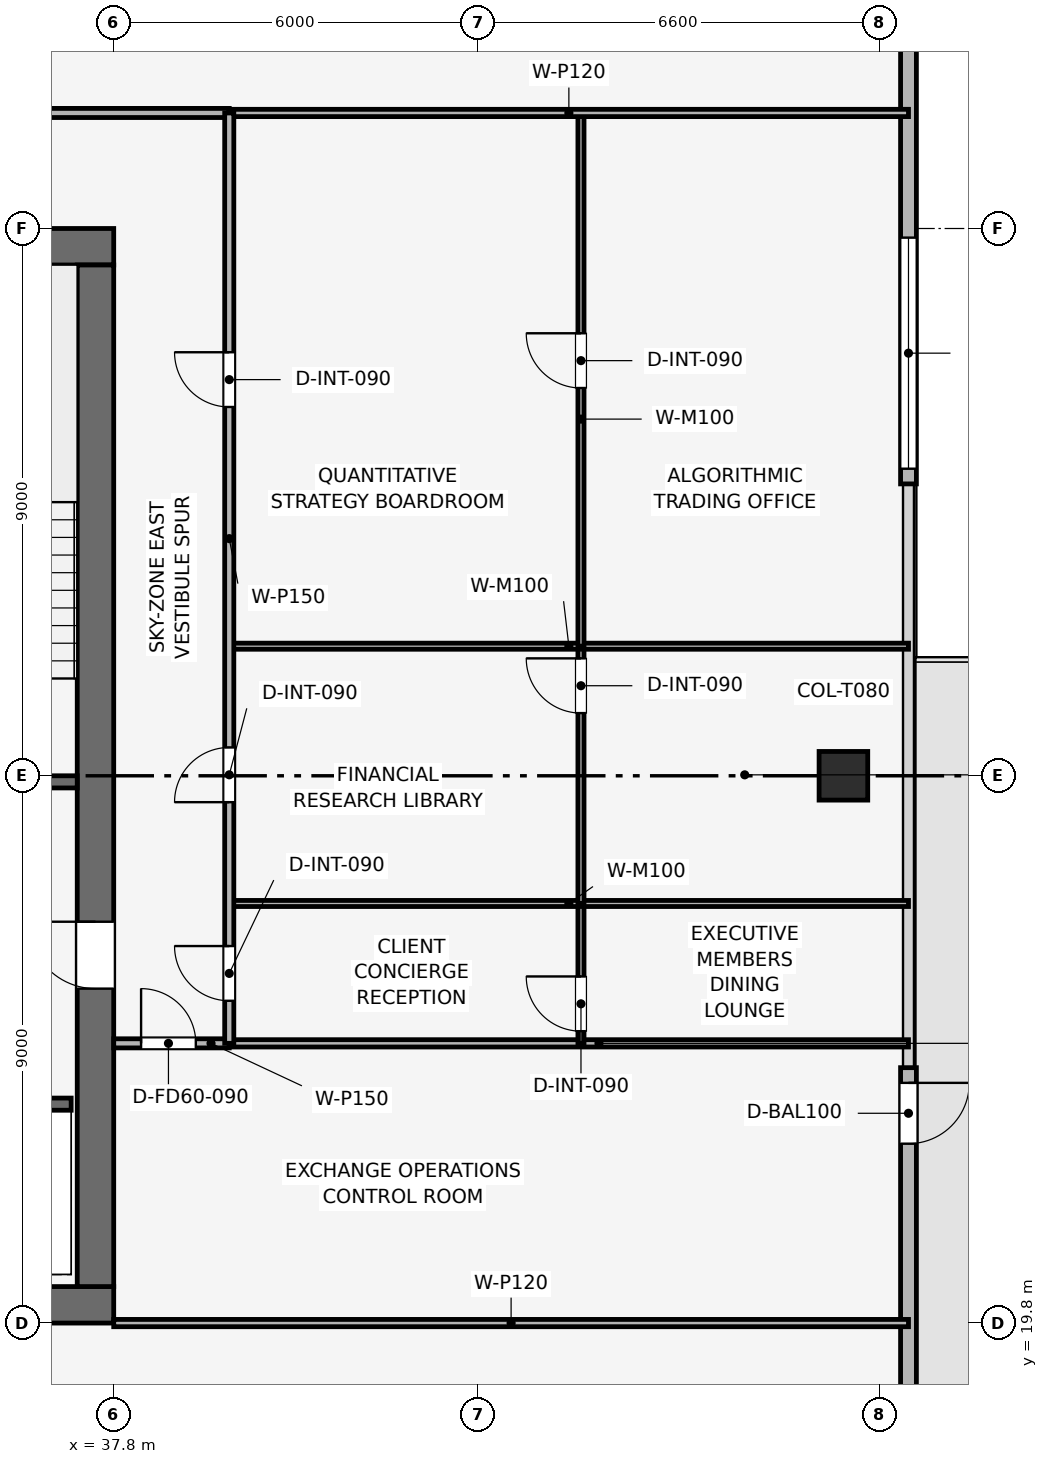
"""IFC4 building model, lengths in metres.
Left out: names, types, materials, properties, quantities, classifications, styles, units other than length and angle.
Written with IfcOpenShell. Run it as: python <this file> out.ifc"""

import sys

from ifc_helpers import new_model, si_unit, direction, frame, frame_2d, origin, origin_2d, place, context, subcontext, project, spatial, rectangle, extrude, element, fill, save


model = new_model("IFC4")
c1 = context("Model", 3, precision=1e-05, world=origin(), true_north=direction((0.0, 1.0)))
c2 = subcontext(c1, "Body", "Model", "MODEL_VIEW")
j1 = project(units=[si_unit("LENGTHUNIT", "METRE"), si_unit("PLANEANGLEUNIT", "RADIAN")], contexts=[c1])
p1 = place(None, origin())
s1 = spatial("IfcSite", under=j1, at=p1, CompositionType="ELEMENT")
p2 = place(p1, origin())
s2 = spatial("IfcBuilding", under=s1, at=p2, CompositionType="ELEMENT")
p3 = place(p2, frame((0.0, 0.0, 336.75)))
s3 = spatial("IfcBuildingStorey", under=s2, at=p3, CompositionType="ELEMENT", Elevation=336.75)
p4 = place(p3, frame((19.8, 20.1, 0.0), z_axis=(0.0, 0.0, 1.0), x_axis=(1.0, 0.0, 0.0)))
e1 = element("IfcWall", 1, at=p4, inside=s3, PredefinedType="SHEAR", context=c2, shape_type="SweptSolid", body=[
    extrude(rectangle(XDim=18.0, YDim=0.6, at=frame_2d((9.0, 0.0))), origin(), (0.0, 0.0, 1.0), 3.75),
])
p5 = place(p3, frame((19.8, 37.5, 0.0), z_axis=(0.0, 0.0, 1.0), x_axis=(1.0, 0.0, 0.0)))
e2 = element("IfcWall", 2, at=p5, inside=s3, PredefinedType="SHEAR", context=c2, shape_type="SweptSolid", body=[
    extrude(rectangle(XDim=18.0, YDim=0.6, at=frame_2d((9.0, 0.0))), origin(), (0.0, 0.0, 1.0), 3.75),
])
p6 = place(p5, frame((7.05, 0.0, 0.0)))
e3 = element("IfcOpeningElement", 3, at=p6, cuts=e2, PredefinedType="OPENING", context=c2, shape_type="SweptSolid", body=[
    extrude(rectangle(XDim=1.1, YDim=2.15, at=frame_2d((0.55, 1.075))), frame((0.0, 0.31, 0.0), z_axis=(0.0, -1.0, 0.0), x_axis=(1.0, 0.0, 0.0)), (0.0, 0.0, 1.0), 0.62),
])
p7 = place(p3, frame((37.5, 20.4, 0.0), z_axis=(0.0, 0.0, 1.0), x_axis=(0.0, 1.0, 0.0)))
e4 = element("IfcWall", 4, at=p7, inside=s3, PredefinedType="SHEAR", context=c2, shape_type="SweptSolid", body=[
    extrude(rectangle(XDim=16.8, YDim=0.6, at=frame_2d((8.4, 0.0))), origin(), (0.0, 0.0, 1.0), 3.75),
])
p8 = place(p7, frame((4.9, 0.0, 0.0)))
e5 = element("IfcOpeningElement", 5, at=p8, cuts=e4, PredefinedType="OPENING", context=c2, shape_type="SweptSolid", body=[
    extrude(rectangle(XDim=1.1, YDim=2.15, at=frame_2d((0.55, 1.075))), frame((0.0, 0.31, 0.0), z_axis=(0.0, -1.0, 0.0), x_axis=(1.0, 0.0, 0.0)), (0.0, 0.0, 1.0), 0.62),
])
p9 = place(p3, frame((49.8, 28.8, 0.003), z_axis=(0.0, 0.0, 1.0), x_axis=(1.0, 0.0, 0.0)))
e6 = element("IfcColumn", 6, at=p9, inside=s3, PredefinedType="COLUMN", context=c2, shape_type="SweptSolid", body=[
    extrude(rectangle(XDim=0.8, YDim=0.8, at=origin_2d()), origin(), (0.0, 0.0, 1.0), 3.504),
])
p10 = place(p3, frame((50.87, 45.0, 0.0), z_axis=(0.0, 0.0, 1.0), x_axis=(0.0, -1.0, 0.0)))
e7 = element("IfcWall", 7, at=p10, inside=s3, PredefinedType="SOLIDWALL", context=c2, shape_type="SweptSolid", body=[
    extrude(rectangle(XDim=11.4, YDim=0.26, at=frame_2d((5.7, 0.0))), origin(), (0.0, 0.0, 1.0), 3.51),
])
p11 = place(p10, frame((7.35, 0.0, 0.9)))
e8 = element("IfcOpeningElement", 8, at=p11, cuts=e7, PredefinedType="OPENING", context=c2, shape_type="SweptSolid", body=[
    extrude(rectangle(XDim=3.8, YDim=1.9, at=frame_2d((1.9, 0.95))), frame((0.0, 0.14, 0.0), z_axis=(0.0, -1.0, 0.0), x_axis=(1.0, 0.0, 0.0)), (0.0, 0.0, 1.0), 0.28),
])
p12 = place(p3, frame((50.87, 24.0, 0.0), z_axis=(0.0, 0.0, 1.0), x_axis=(0.0, -1.0, 0.0)))
e9 = element("IfcWall", 9, at=p12, inside=s3, PredefinedType="SOLIDWALL", context=c2, shape_type="SweptSolid", body=[
    extrude(rectangle(XDim=11.4, YDim=0.26, at=frame_2d((5.7, 0.0))), origin(), (0.0, 0.0, 1.0), 3.51),
])
p13 = place(p12, frame((0.25, 0.0, 0.0)))
e10 = element("IfcOpeningElement", 10, at=p13, cuts=e9, PredefinedType="OPENING", context=c2, shape_type="SweptSolid", body=[
    extrude(rectangle(XDim=1.0, YDim=2.2, at=frame_2d((0.5, 1.1))), frame((0.0, 0.14, 0.0), z_axis=(0.0, -1.0, 0.0), x_axis=(1.0, 0.0, 0.0)), (0.0, 0.0, 1.0), 0.28),
])
p14 = place(p3, frame((34.05, 28.7, 0.0), z_axis=(0.0, 0.0, 1.0), x_axis=(1.0, 0.0, 0.0)))
e11 = element("IfcWall", 11, at=p14, inside=s3, PredefinedType="SHEAR", context=c2, shape_type="SweptSolid", body=[
    extrude(rectangle(XDim=3.15, YDim=0.2, at=frame_2d((1.575, 0.0))), origin(), (0.0, 0.0, 1.0), 3.51),
])
p15 = place(p14, frame((0.8, 0.0, 0.0)))
e12 = element("IfcOpeningElement", 12, at=p15, cuts=e11, PredefinedType="OPENING", context=c2, shape_type="SweptSolid", body=[
    extrude(rectangle(XDim=1.0, YDim=2.1, at=frame_2d((0.5, 1.05))), frame((0.0, 0.11, 0.0), z_axis=(0.0, -1.0, 0.0), x_axis=(1.0, 0.0, 0.0)), (0.0, 0.0, 1.0), 0.22),
])
p16 = place(p3, frame((34.05, 23.4, 0.0), z_axis=(0.0, 0.0, 1.0), x_axis=(1.0, 0.0, 0.0)))
e13 = element("IfcWall", 13, at=p16, inside=s3, PredefinedType="SHEAR", context=c2, shape_type="SweptSolid", body=[
    extrude(rectangle(XDim=3.05, YDim=0.2, at=frame_2d((1.525, 0.0))), origin(), (0.0, 0.0, 1.0), 3.51),
])
p17 = place(p16, frame((1.2, 0.0, 0.0)))
e14 = element("IfcOpeningElement", 14, at=p17, cuts=e13, PredefinedType="OPENING", context=c2, shape_type="SweptSolid", body=[
    extrude(rectangle(XDim=1.1, YDim=2.15, at=frame_2d((0.55, 1.075))), frame((0.0, 0.11, 0.0), z_axis=(0.0, -1.0, 0.0), x_axis=(1.0, 0.0, 0.0)), (0.0, 0.0, 1.0), 0.22),
])
p18 = place(p3, frame((37.8, 19.8, 0.0), z_axis=(0.0, 0.0, 1.0), x_axis=(1.0, 0.0, 0.0)))
e15 = element("IfcWall", 15, at=p18, inside=s3, PredefinedType="PARTITIONING", context=c2, shape_type="SweptSolid", body=[
    extrude(rectangle(XDim=13.07, YDim=0.12, at=frame_2d((6.535, 0.0))), origin(), (0.0, 0.0, 1.0), 3.095),
])
p19 = place(p3, frame((37.8, 24.4, 0.0), z_axis=(0.0, 0.0, 1.0), x_axis=(1.0, 0.0, 0.0)))
e16 = element("IfcWall", 16, at=p19, inside=s3, PredefinedType="PARTITIONING", context=c2, shape_type="SweptSolid", body=[
    extrude(rectangle(XDim=1.9, YDim=0.15, at=frame_2d((0.95, 0.0))), origin(), (0.0, 0.0, 1.0), 3.51),
])
p20 = place(p19, frame((0.45, 0.0, 0.0)))
e17 = element("IfcOpeningElement", 17, at=p20, cuts=e16, PredefinedType="OPENING", context=c2, shape_type="SweptSolid", body=[
    extrude(rectangle(XDim=0.9, YDim=2.1, at=frame_2d((0.45, 1.05))), frame((0.0, 0.085, 0.0), z_axis=(0.0, -1.0, 0.0), x_axis=(1.0, 0.0, 0.0)), (0.0, 0.0, 1.0), 0.17),
])
p21 = place(p3, frame((39.7, 24.4, 0.0), z_axis=(0.0, 0.0, 1.0), x_axis=(1.0, 0.0, 0.0)))
e18 = element("IfcWall", 18, at=p21, inside=s3, PredefinedType="PARTITIONING", context=c2, shape_type="SweptSolid", body=[
    extrude(rectangle(XDim=11.17, YDim=0.12, at=frame_2d((5.585, 0.0))), origin(), (0.0, 0.0, 1.0), 3.135),
])
p22 = place(p3, frame((45.484, 24.4, 0.0), z_axis=(0.0, 0.0, 1.0), x_axis=(0.0, 1.0, 0.0)))
e19 = element("IfcWall", 19, at=p22, inside=s3, PredefinedType="MOVABLE", context=c2, shape_type="SweptSolid", body=[
    extrude(rectangle(XDim=2.3, YDim=0.1, at=frame_2d((1.15, 0.0))), origin(), (0.0, 0.0, 1.0), 3.51),
])
p23 = place(p22, frame((0.2, 0.0, 0.0)))
e20 = element("IfcOpeningElement", 20, at=p23, cuts=e19, PredefinedType="OPENING", context=c2, shape_type="SweptSolid", body=[
    extrude(rectangle(XDim=0.9, YDim=2.1, at=frame_2d((0.45, 1.05))), frame((0.0, 0.06, 0.0), z_axis=(0.0, -1.0, 0.0), x_axis=(1.0, 0.0, 0.0)), (0.0, 0.0, 1.0), 0.12),
])
p24 = place(p3, frame((39.7, 26.7, 0.0), z_axis=(0.0, 0.0, 1.0), x_axis=(1.0, 0.0, 0.0)))
e21 = element("IfcWall", 21, at=p24, inside=s3, PredefinedType="MOVABLE", context=c2, shape_type="SweptSolid", body=[
    extrude(rectangle(XDim=11.17, YDim=0.1, at=frame_2d((5.585, 0.0))), origin(), (0.0, 0.0, 1.0), 3.135),
])
p25 = place(p3, frame((45.484, 26.7, 0.0), z_axis=(0.0, 0.0, 1.0), x_axis=(0.0, 1.0, 0.0)))
e22 = element("IfcWall", 22, at=p25, inside=s3, PredefinedType="MOVABLE", context=c2, shape_type="SweptSolid", body=[
    extrude(rectangle(XDim=4.231, YDim=0.1, at=frame_2d((2.115, 0.0))), origin(), (0.0, 0.0, 1.0), 3.095),
])
p26 = place(p25, frame((3.131, 0.0, 0.0)))
e23 = element("IfcOpeningElement", 23, at=p26, cuts=e22, PredefinedType="OPENING", context=c2, shape_type="SweptSolid", body=[
    extrude(rectangle(XDim=0.9, YDim=2.1, at=frame_2d((0.45, 1.05))), frame((0.0, 0.06, 0.0), z_axis=(0.0, -1.0, 0.0), x_axis=(1.0, 0.0, 0.0)), (0.0, 0.0, 1.0), 0.12),
])
p27 = place(p3, frame((39.7, 30.931, 0.0), z_axis=(0.0, 0.0, 1.0), x_axis=(1.0, 0.0, 0.0)))
e24 = element("IfcWall", 24, at=p27, inside=s3, PredefinedType="MOVABLE", context=c2, shape_type="SweptSolid", body=[
    extrude(rectangle(XDim=11.17, YDim=0.1, at=frame_2d((5.585, 0.0))), origin(), (0.0, 0.0, 1.0), 3.135),
])
p28 = place(p3, frame((45.484, 30.931, 0.0), z_axis=(0.0, 0.0, 1.0), x_axis=(0.0, 1.0, 0.0)))
e25 = element("IfcWall", 25, at=p28, inside=s3, PredefinedType="MOVABLE", context=c2, shape_type="SweptSolid", body=[
    extrude(rectangle(XDim=8.769, YDim=0.1, at=frame_2d((4.385, 0.0))), origin(), (0.0, 0.0, 1.0), 3.095),
])
p29 = place(p28, frame((4.246, 0.0, 0.0)))
e26 = element("IfcOpeningElement", 26, at=p29, cuts=e25, PredefinedType="OPENING", context=c2, shape_type="SweptSolid", body=[
    extrude(rectangle(XDim=0.9, YDim=2.1, at=frame_2d((0.45, 1.05))), frame((0.0, 0.06, 0.0), z_axis=(0.0, -1.0, 0.0), x_axis=(1.0, 0.0, 0.0)), (0.0, 0.0, 1.0), 0.12),
])
p30 = place(p3, frame((39.7, 39.7, 0.0), z_axis=(0.0, 0.0, 1.0), x_axis=(1.0, 0.0, 0.0)))
e27 = element("IfcWall", 27, at=p30, inside=s3, PredefinedType="PARTITIONING", context=c2, shape_type="SweptSolid", body=[
    extrude(rectangle(XDim=11.17, YDim=0.12, at=frame_2d((5.585, 0.0))), origin(), (0.0, 0.0, 1.0), 3.095),
])
p31 = place(p3, frame((17.9, 39.7, 0.0), z_axis=(0.0, 0.0, 1.0), x_axis=(1.0, 0.0, 0.0)))
e28 = element("IfcWall", 28, at=p31, inside=s3, PredefinedType="PARTITIONING", context=c2, shape_type="SweptSolid", body=[
    extrude(rectangle(XDim=21.8, YDim=0.15, at=frame_2d((10.9, 0.0))), origin(), (0.0, 0.0, 1.0), 3.095),
])
p32 = place(p31, frame((5.516, 0.0, 0.0)))
e29 = element("IfcOpeningElement", 29, at=p32, cuts=e28, PredefinedType="OPENING", context=c2, shape_type="SweptSolid", body=[
    extrude(rectangle(XDim=0.9, YDim=2.1, at=frame_2d((0.45, 1.05))), frame((0.0, 0.085, 0.0), z_axis=(0.0, -1.0, 0.0), x_axis=(1.0, 0.0, 0.0)), (0.0, 0.0, 1.0), 0.17),
])
p33 = place(p31, frame((16.416, 0.0, 0.0)))
e30 = element("IfcOpeningElement", 30, at=p33, cuts=e28, PredefinedType="OPENING", context=c2, shape_type="SweptSolid", body=[
    extrude(rectangle(XDim=0.9, YDim=2.1, at=frame_2d((0.45, 1.05))), frame((0.0, 0.085, 0.0), z_axis=(0.0, -1.0, 0.0), x_axis=(1.0, 0.0, 0.0)), (0.0, 0.0, 1.0), 0.17),
])
p34 = place(p3, frame((39.7, 24.4, 0.0), z_axis=(0.0, 0.0, 1.0), x_axis=(0.0, 1.0, 0.0)))
e31 = element("IfcWall", 31, at=p34, inside=s3, PredefinedType="PARTITIONING", context=c2, shape_type="SweptSolid", body=[
    extrude(rectangle(XDim=15.3, YDim=0.15, at=frame_2d((7.65, 0.0))), origin(), (0.0, 0.0, 1.0), 3.095),
])
p35 = place(p34, frame((0.7, 0.0, 0.0)))
e32 = element("IfcOpeningElement", 32, at=p35, cuts=e31, PredefinedType="OPENING", context=c2, shape_type="SweptSolid", body=[
    extrude(rectangle(XDim=0.9, YDim=2.1, at=frame_2d((0.45, 1.05))), frame((0.0, 0.085, 0.0), z_axis=(0.0, -1.0, 0.0), x_axis=(1.0, 0.0, 0.0)), (0.0, 0.0, 1.0), 0.17),
])
p36 = place(p34, frame((3.966, 0.0, 0.0)))
e33 = element("IfcOpeningElement", 33, at=p36, cuts=e31, PredefinedType="OPENING", context=c2, shape_type="SweptSolid", body=[
    extrude(rectangle(XDim=0.9, YDim=2.1, at=frame_2d((0.45, 1.05))), frame((0.0, 0.085, 0.0), z_axis=(0.0, -1.0, 0.0), x_axis=(1.0, 0.0, 0.0)), (0.0, 0.0, 1.0), 0.17),
])
p37 = place(p34, frame((10.465, 0.0, 0.0)))
e34 = element("IfcOpeningElement", 34, at=p37, cuts=e31, PredefinedType="OPENING", context=c2, shape_type="SweptSolid", body=[
    extrude(rectangle(XDim=0.9, YDim=2.1, at=frame_2d((0.45, 1.05))), frame((0.0, 0.085, 0.0), z_axis=(0.0, -1.0, 0.0), x_axis=(1.0, 0.0, 0.0)), (0.0, 0.0, 1.0), 0.17),
])
p38 = place(p13, origin())
e35 = element("IfcDoor", 35, at=p38, inside=s3, OperationType="SINGLE_SWING_LEFT", PredefinedType="DOOR", context=c2, shape_type="SweptSolid", body=[
    extrude(rectangle(XDim=1.0, YDim=2.2, at=frame_2d((0.5, 1.1))), frame((0.0, 0.025, 0.0), z_axis=(0.0, -1.0, 0.0), x_axis=(1.0, 0.0, 0.0)), (0.0, 0.0, 1.0), 0.05),
])
fill(e10, e35)
p39 = place(p11, origin())
e36 = element("IfcWindow", 36, at=p39, inside=s3, PartitioningType="SINGLE_PANEL", PredefinedType="WINDOW", context=c2, shape_type="SweptSolid", body=[
    extrude(rectangle(XDim=3.8, YDim=1.9, at=frame_2d((1.9, 0.95))), frame((0.0, 0.03, 0.0), z_axis=(0.0, -1.0, 0.0), x_axis=(1.0, 0.0, 0.0)), (0.0, 0.0, 1.0), 0.06),
])
fill(e8, e36)
p40 = place(p20, origin())
e37 = element("IfcDoor", 37, at=p40, inside=s3, OperationType="SINGLE_SWING_LEFT", PredefinedType="DOOR", context=c2, shape_type="SweptSolid", body=[
    extrude(rectangle(XDim=0.9, YDim=2.1, at=frame_2d((0.45, 1.05))), frame((0.0, 0.025, 0.0), z_axis=(0.0, -1.0, 0.0), x_axis=(1.0, 0.0, 0.0)), (0.0, 0.0, 1.0), 0.05),
])
fill(e17, e37)
p41 = place(p23, origin())
e38 = element("IfcDoor", 38, at=p41, inside=s3, OperationType="SINGLE_SWING_RIGHT", PredefinedType="DOOR", context=c2, shape_type="SweptSolid", body=[
    extrude(rectangle(XDim=0.9, YDim=2.1, at=frame_2d((0.45, 1.05))), frame((0.0, 0.025, 0.0), z_axis=(0.0, -1.0, 0.0), x_axis=(1.0, 0.0, 0.0)), (0.0, 0.0, 1.0), 0.05),
])
fill(e20, e38)
p42 = place(p26, origin())
e39 = element("IfcDoor", 39, at=p42, inside=s3, OperationType="SINGLE_SWING_RIGHT", PredefinedType="DOOR", context=c2, shape_type="SweptSolid", body=[
    extrude(rectangle(XDim=0.9, YDim=2.1, at=frame_2d((0.45, 1.05))), frame((0.0, 0.025, 0.0), z_axis=(0.0, -1.0, 0.0), x_axis=(1.0, 0.0, 0.0)), (0.0, 0.0, 1.0), 0.05),
])
fill(e23, e39)
p43 = place(p29, origin())
e40 = element("IfcDoor", 40, at=p43, inside=s3, OperationType="SINGLE_SWING_RIGHT", PredefinedType="DOOR", context=c2, shape_type="SweptSolid", body=[
    extrude(rectangle(XDim=0.9, YDim=2.1, at=frame_2d((0.45, 1.05))), frame((0.0, 0.025, 0.0), z_axis=(0.0, -1.0, 0.0), x_axis=(1.0, 0.0, 0.0)), (0.0, 0.0, 1.0), 0.05),
])
fill(e26, e40)
p44 = place(p35, origin())
e41 = element("IfcDoor", 41, at=p44, inside=s3, OperationType="SINGLE_SWING_RIGHT", PredefinedType="DOOR", context=c2, shape_type="SweptSolid", body=[
    extrude(rectangle(XDim=0.9, YDim=2.1, at=frame_2d((0.45, 1.05))), frame((0.0, 0.025, 0.0), z_axis=(0.0, -1.0, 0.0), x_axis=(1.0, 0.0, 0.0)), (0.0, 0.0, 1.0), 0.05),
])
fill(e32, e41)
p45 = place(p36, origin())
e42 = element("IfcDoor", 42, at=p45, inside=s3, OperationType="SINGLE_SWING_LEFT", PredefinedType="DOOR", context=c2, shape_type="SweptSolid", body=[
    extrude(rectangle(XDim=0.9, YDim=2.1, at=frame_2d((0.45, 1.05))), frame((0.0, 0.025, 0.0), z_axis=(0.0, -1.0, 0.0), x_axis=(1.0, 0.0, 0.0)), (0.0, 0.0, 1.0), 0.05),
])
fill(e33, e42)
p46 = place(p37, origin())
e43 = element("IfcDoor", 43, at=p46, inside=s3, OperationType="SINGLE_SWING_RIGHT", PredefinedType="DOOR", context=c2, shape_type="SweptSolid", body=[
    extrude(rectangle(XDim=0.9, YDim=2.1, at=frame_2d((0.45, 1.05))), frame((0.0, 0.025, 0.0), z_axis=(0.0, -1.0, 0.0), x_axis=(1.0, 0.0, 0.0)), (0.0, 0.0, 1.0), 0.05),
])
fill(e34, e43)
p47 = place(p8, origin())
e44 = element("IfcDoor", 44, at=p47, inside=s3, OperationType="SINGLE_SWING_RIGHT", PredefinedType="DOOR", context=c2, shape_type="SweptSolid", body=[
    extrude(rectangle(XDim=1.1, YDim=2.15, at=frame_2d((0.55, 1.075))), frame((0.0, 0.025, 0.0), z_axis=(0.0, -1.0, 0.0), x_axis=(1.0, 0.0, 0.0)), (0.0, 0.0, 1.0), 0.05),
])
fill(e5, e44)
save(model, sys.argv[1])
